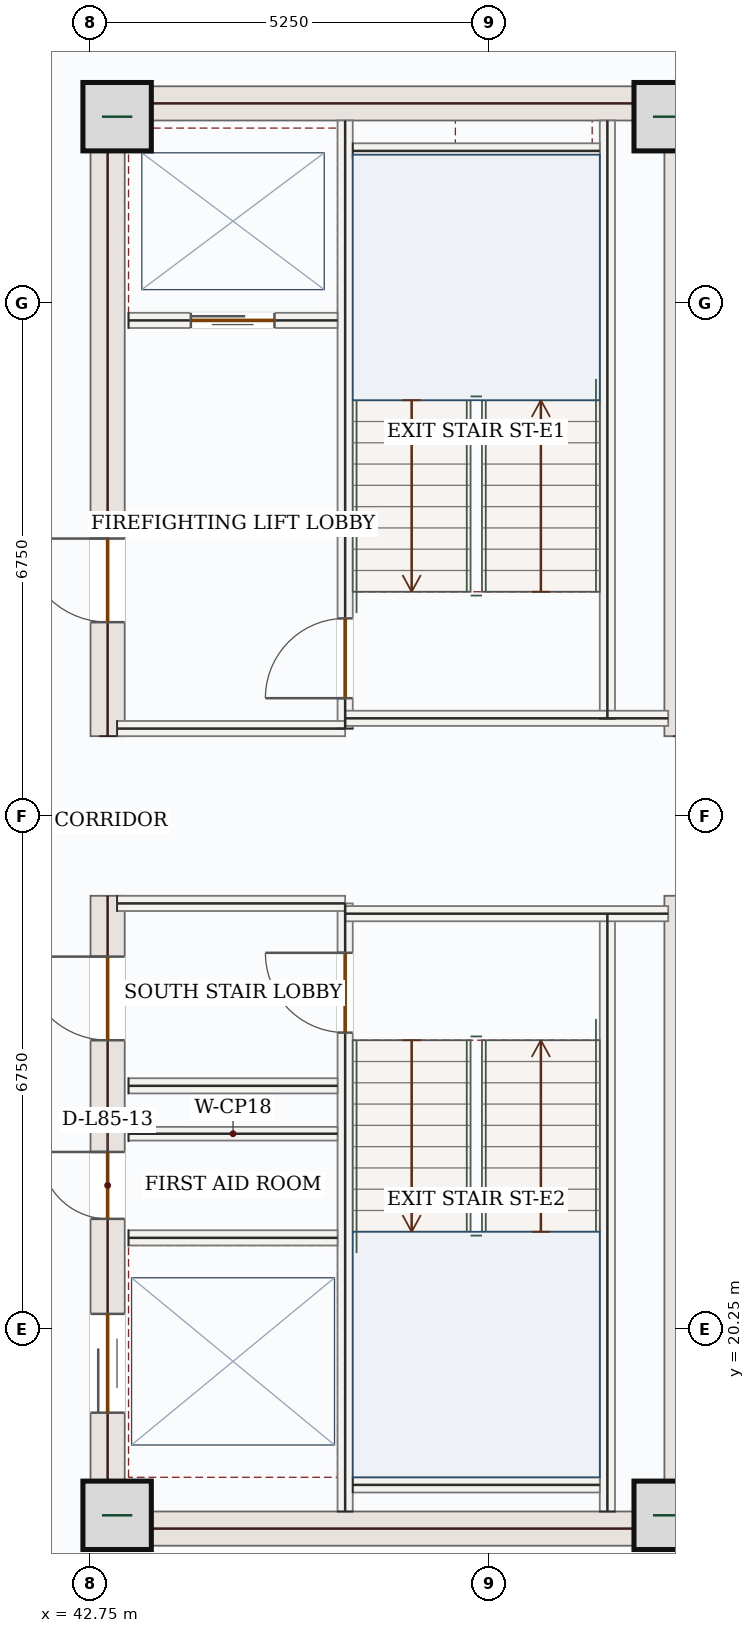
"""IFC4 building model, lengths in metres.
Left out: names, types, materials, properties, quantities, classifications, styles, units other than length and angle.
Written with IfcOpenShell. Run it as: python <this file> out.ifc"""

import sys

from ifc_helpers import new_model, si_unit, direction, frame, frame_2d, origin, origin_2d, place, context, subcontext, project, spatial, rectangle, extrude, source, transform, mapped, element, fill, save


model = new_model("IFC4")
c1 = context("Model", 3, precision=1e-05, world=origin(), true_north=direction((0.0, 1.0)))
c2 = subcontext(c1, "Body", "Model", "MODEL_VIEW")
j1 = project(units=[si_unit("LENGTHUNIT", "METRE"), si_unit("PLANEANGLEUNIT", "RADIAN")], contexts=[c1])
p1 = place(None, origin())
s1 = spatial("IfcSite", under=j1, at=p1, CompositionType="ELEMENT")
p2 = place(p1, origin())
s2 = spatial("IfcBuilding", under=s1, at=p2, CompositionType="ELEMENT")
p3 = place(p2, frame((0.0, 0.0, 349.8)))
s3 = spatial("IfcBuildingStorey", under=s2, at=p3, CompositionType="ELEMENT", Elevation=349.8)
p4 = place(p3, frame((42.975, 17.4, 0.0), z_axis=(0.0, 0.0, 1.0), x_axis=(0.0, 1.0, 0.0)))
e1 = element("IfcWall", 1, at=p4, inside=s3, PredefinedType="SHEAR", context=c2, shape_type="SweptSolid", body=[
    extrude(rectangle(XDim=8.55, YDim=0.45, at=frame_2d((4.275, 0.0))), origin(), (0.0, 0.0, 1.0), 3.5),
])
p5 = place(p4, frame((6.65, 0.0, 0.0)))
e2 = element("IfcOpeningElement", 2, at=p5, cuts=e1, PredefinedType="OPENING", context=c2, shape_type="SweptSolid", body=[
    extrude(rectangle(XDim=1.1, YDim=2.2, at=frame_2d((0.55, 1.1))), frame((0.0, 0.235, 0.0), z_axis=(0.0, -1.0, 0.0), x_axis=(1.0, 0.0, 0.0)), (0.0, 0.0, 1.0), 0.47),
])
p6 = place(p4, frame((1.75, 0.0, 0.0)))
e3 = element("IfcOpeningElement", 3, at=p6, cuts=e1, PredefinedType="OPENING", context=c2, shape_type="SweptSolid", body=[
    extrude(rectangle(XDim=1.3, YDim=2.2, at=frame_2d((0.65, 1.1))), frame((0.0, 0.235, 0.0), z_axis=(0.0, -1.0, 0.0), x_axis=(1.0, 0.0, 0.0)), (0.0, 0.0, 1.0), 0.47),
])
p7 = place(p4, frame((4.3, 0.0, 0.0)))
e4 = element("IfcOpeningElement", 4, at=p7, cuts=e1, PredefinedType="OPENING", context=c2, shape_type="SweptSolid", body=[
    extrude(rectangle(XDim=0.88, YDim=2.1, at=frame_2d((0.44, 1.05))), frame((0.0, 0.235, 0.0), z_axis=(0.0, -1.0, 0.0), x_axis=(1.0, 0.0, 0.0)), (0.0, 0.0, 1.0), 0.47),
])
p8 = place(p3, frame((42.975, 28.05, 0.0), z_axis=(0.0, 0.0, 1.0), x_axis=(0.0, 1.0, 0.0)))
e5 = element("IfcWall", 5, at=p8, inside=s3, PredefinedType="SHEAR", context=c2, shape_type="SweptSolid", body=[
    extrude(rectangle(XDim=8.55, YDim=0.45, at=frame_2d((4.275, 0.0))), origin(), (0.0, 0.0, 1.0), 3.5),
])
p9 = place(p8, frame((1.5, 0.0, 0.0)))
e6 = element("IfcOpeningElement", 6, at=p9, cuts=e5, PredefinedType="OPENING", context=c2, shape_type="SweptSolid", body=[
    extrude(rectangle(XDim=1.1, YDim=2.2, at=frame_2d((0.55, 1.1))), frame((0.0, 0.235, 0.0), z_axis=(0.0, -1.0, 0.0), x_axis=(1.0, 0.0, 0.0)), (0.0, 0.0, 1.0), 0.47),
])
m1 = source(origin(), c2, "Body", "SweptSolid", [
    extrude(rectangle(XDim=8.55, YDim=0.45, at=frame_2d((4.275, 0.0))), origin(), (0.0, 0.0, 1.0), 3.5),
])
for number, where, z_axis, x_axis in (
    (7, (50.525, 17.4, 0.0), (0.0, 0.0, 1.0), (0.0, 1.0, 0.0)),
    (8, (50.525, 28.05, 0.0), (0.0, 0.0, 1.0), (0.0, 1.0, 0.0)),
):
    element("IfcWall", number, at=place(p3, frame(where, z_axis=z_axis, x_axis=x_axis)), inside=s3, PredefinedType="SHEAR", context=c2, shape_type="MappedRepresentation", body=[
        mapped(m1, transform((0.0, 0.0, 0.0), x_axis=(1.0, 0.0, 0.0), y_axis=(0.0, 1.0, 0.0), z_axis=(0.0, 0.0, 1.0), scale=1.0)),
    ])
m2 = source(origin(), c2, "Body", "SweptSolid", [
    extrude(rectangle(XDim=7.1, YDim=0.45, at=frame_2d((3.55, 0.0))), origin(), (0.0, 0.0, 1.0), 3.5),
])
for number, where, z_axis, x_axis in (
    (9, (43.2, 17.625, 0.0), (0.0, 0.0, 1.0), (1.0, 0.0, 0.0)),
    (10, (43.2, 36.375, 0.0), (0.0, 0.0, 1.0), (1.0, 0.0, 0.0)),
):
    element("IfcWall", number, at=place(p3, frame(where, z_axis=z_axis, x_axis=x_axis)), inside=s3, PredefinedType="SHEAR", context=c2, shape_type="MappedRepresentation", body=[
        mapped(m2, transform((0.0, 0.0, 0.0), x_axis=(1.0, 0.0, 0.0), y_axis=(0.0, 1.0, 0.0), z_axis=(0.0, 0.0, 1.0), scale=1.0)),
    ])
m3 = source(origin(), c2, "Body", "SweptSolid", [
    extrude(rectangle(XDim=0.9, YDim=0.9, at=origin_2d()), origin(), (0.0, 0.0, 1.0), 3.75),
])
for number, where, z_axis, x_axis in (
    (11, (43.1, 17.8, 0.0), (0.0, 0.0, 1.0), (1.0, 0.0, 0.0)),
    (12, (50.35, 17.8, 0.0), (0.0, 0.0, 1.0), (1.0, 0.0, 0.0)),
    (13, (43.1, 36.2, 0.0), (0.0, 0.0, 1.0), (1.0, 0.0, 0.0)),
    (14, (50.35, 36.2, 0.0), (0.0, 0.0, 1.0), (1.0, 0.0, 0.0)),
):
    element("IfcColumn", number, at=place(p3, frame(where, z_axis=z_axis, x_axis=x_axis)), inside=s3, PredefinedType="COLUMN", context=c2, shape_type="MappedRepresentation", body=[
        mapped(m3, transform((0.0, 0.0, 0.0), x_axis=(1.0, 0.0, 0.0), y_axis=(0.0, 1.0, 0.0), z_axis=(0.0, 0.0, 1.0), scale=1.0)),
    ])
p10 = place(p3, frame((49.833, 39.006, 0.0), z_axis=(0.0, 0.0, 1.0), x_axis=(0.681733754317, -0.731600361006, 0.0)))
e15 = element("IfcWall", 15, at=p10, inside=s3, PredefinedType="SOLIDWALL", context=c2, shape_type="SweptSolid", body=[
    extrude(rectangle(XDim=4.734, YDim=0.28, at=frame_2d((2.367, 0.0))), origin(), (0.0, 0.0, 1.0), 3.5),
])
p11 = place(p10, frame((1.617, 0.0, 0.85)))
e16 = element("IfcOpeningElement", 16, at=p11, cuts=e15, PredefinedType="OPENING", context=c2, shape_type="SweptSolid", body=[
    extrude(rectangle(XDim=1.5, YDim=1.5, at=frame_2d((0.75, 0.75))), frame((0.0, 0.15, 0.0), z_axis=(0.0, -1.0, 0.0), x_axis=(1.0, 0.0, 0.0)), (0.0, 0.0, 1.0), 0.3),
])
m4 = source(origin(), c2, "Body", "SweptSolid", [
    extrude(rectangle(XDim=7.87, YDim=0.2, at=frame_2d((3.935, 0.0))), origin(), (0.0, 0.0, 1.0), 3.5),
])
for number, where, z_axis, x_axis in (
    (17, (49.55, 17.85, 0.0), (0.0, 0.0, 1.0), (0.0, 1.0, 0.0)),
    (18, (49.55, 28.28, 0.0), (0.0, 0.0, 1.0), (0.0, 1.0, 0.0)),
):
    element("IfcWall", number, at=place(p3, frame(where, z_axis=z_axis, x_axis=x_axis)), inside=s3, PredefinedType="SOLIDWALL", context=c2, shape_type="MappedRepresentation", body=[
        mapped(m4, transform((0.0, 0.0, 0.0), x_axis=(1.0, 0.0, 0.0), y_axis=(0.0, 1.0, 0.0), z_axis=(0.0, 0.0, 1.0), scale=1.0)),
    ])
p12 = place(p3, frame((46.1, 17.85, 0.0), z_axis=(0.0, 0.0, 1.0), x_axis=(0.0, 1.0, 0.0)))
e19 = element("IfcWall", 19, at=p12, inside=s3, PredefinedType="SOLIDWALL", context=c2, shape_type="SweptSolid", body=[
    extrude(rectangle(XDim=8.0, YDim=0.2, at=frame_2d((4.0, 0.0))), origin(), (0.0, 0.0, 1.0), 3.5),
])
p13 = place(p12, frame((6.3, 0.0, 0.0)))
e20 = element("IfcOpeningElement", 20, at=p13, cuts=e19, PredefinedType="OPENING", context=c2, shape_type="SweptSolid", body=[
    extrude(rectangle(XDim=1.05, YDim=2.15, at=frame_2d((0.525, 1.075))), frame((0.0, 0.11, 0.0), z_axis=(0.0, -1.0, 0.0), x_axis=(1.0, 0.0, 0.0)), (0.0, 0.0, 1.0), 0.22),
])
p14 = place(p3, frame((46.1, 28.15, 0.0), z_axis=(0.0, 0.0, 1.0), x_axis=(0.0, 1.0, 0.0)))
e21 = element("IfcWall", 21, at=p14, inside=s3, PredefinedType="SOLIDWALL", context=c2, shape_type="SweptSolid", body=[
    extrude(rectangle(XDim=8.0, YDim=0.2, at=frame_2d((4.0, 0.0))), origin(), (0.0, 0.0, 1.0), 3.5),
])
p15 = place(p14, frame((0.4, 0.0, 0.0)))
e22 = element("IfcOpeningElement", 22, at=p15, cuts=e21, PredefinedType="OPENING", context=c2, shape_type="SweptSolid", body=[
    extrude(rectangle(XDim=1.05, YDim=2.15, at=frame_2d((0.525, 1.075))), frame((0.0, 0.11, 0.0), z_axis=(0.0, -1.0, 0.0), x_axis=(1.0, 0.0, 0.0)), (0.0, 0.0, 1.0), 0.22),
])
m5 = source(origin(), c2, "Body", "SweptSolid", [
    extrude(rectangle(XDim=3.0, YDim=0.2, at=frame_2d((1.5, 0.0))), origin(), (0.0, 0.0, 1.0), 3.5),
])
p16 = place(p3, frame((43.1, 25.85, 0.0), z_axis=(0.0, 0.0, 1.0), x_axis=(1.0, 0.0, 0.0)))
e23 = element("IfcWall", 23, at=p16, inside=s3, PredefinedType="SOLIDWALL", context=c2, shape_type="MappedRepresentation", body=[
    mapped(m5, transform((0.0, 0.0, 0.0), x_axis=(1.0, 0.0, 0.0), y_axis=(0.0, 1.0, 0.0), z_axis=(0.0, 0.0, 1.0), scale=1.0)),
])
m6 = source(origin(), c2, "Body", "SweptSolid", [
    extrude(rectangle(XDim=4.25, YDim=0.2, at=frame_2d((2.125, 0.0))), origin(), (0.0, 0.0, 1.0), 3.5),
])
p17 = place(p3, frame((46.1, 25.715, 0.0), z_axis=(0.0, 0.0, 1.0), x_axis=(1.0, 0.0, 0.0)))
e24 = element("IfcWall", 24, at=p17, inside=s3, PredefinedType="SOLIDWALL", context=c2, shape_type="MappedRepresentation", body=[
    mapped(m6, transform((0.0, 0.0, 0.0), x_axis=(1.0, 0.0, 0.0), y_axis=(0.0, 1.0, 0.0), z_axis=(0.0, 0.0, 1.0), scale=1.0)),
])
p18 = place(p3, frame((43.1, 28.15, 0.0), z_axis=(0.0, 0.0, 1.0), x_axis=(1.0, 0.0, 0.0)))
e25 = element("IfcWall", 25, at=p18, inside=s3, PredefinedType="SOLIDWALL", context=c2, shape_type="MappedRepresentation", body=[
    mapped(m5, transform((0.0, 0.0, 0.0), x_axis=(1.0, 0.0, 0.0), y_axis=(0.0, 1.0, 0.0), z_axis=(0.0, 0.0, 1.0), scale=1.0)),
])
p19 = place(p3, frame((46.1, 28.285, 0.0), z_axis=(0.0, 0.0, 1.0), x_axis=(1.0, 0.0, 0.0)))
e26 = element("IfcWall", 26, at=p19, inside=s3, PredefinedType="SOLIDWALL", context=c2, shape_type="MappedRepresentation", body=[
    mapped(m6, transform((0.0, 0.0, 0.0), x_axis=(1.0, 0.0, 0.0), y_axis=(0.0, 1.0, 0.0), z_axis=(0.0, 0.0, 1.0), scale=1.0)),
])
m7 = source(origin(), c2, "Body", "SweptSolid", [
    extrude(rectangle(XDim=3.25, YDim=0.2, at=frame_2d((1.625, 0.0))), origin(), (0.0, 0.0, 1.0), 3.5),
])
for number, where, z_axis, x_axis in (
    (27, (46.2, 35.75, 0.0), (0.0, 0.0, 1.0), (1.0, 0.0, 0.0)),
    (28, (46.2, 18.2, 0.0), (0.0, 0.0, 1.0), (1.0, 0.0, 0.0)),
):
    element("IfcWall", number, at=place(p3, frame(where, z_axis=z_axis, x_axis=x_axis)), inside=s3, PredefinedType="SOLIDWALL", context=c2, shape_type="MappedRepresentation", body=[
        mapped(m7, transform((0.0, 0.0, 0.0), x_axis=(1.0, 0.0, 0.0), y_axis=(0.0, 1.0, 0.0), z_axis=(0.0, 0.0, 1.0), scale=1.0)),
    ])
p20 = place(p3, frame((43.25, 33.52, 0.0), z_axis=(0.0, 0.0, 1.0), x_axis=(1.0, 0.0, 0.0)))
e29 = element("IfcWall", 29, at=p20, inside=s3, PredefinedType="SOLIDWALL", context=c2, shape_type="SweptSolid", body=[
    extrude(rectangle(XDim=2.75, YDim=0.2, at=frame_2d((1.375, 0.0))), origin(), (0.0, 0.0, 1.0), 3.5),
])
p21 = place(p20, frame((0.82, 0.0, 0.0)))
e30 = element("IfcOpeningElement", 30, at=p21, cuts=e29, PredefinedType="OPENING", context=c2, shape_type="SweptSolid", body=[
    extrude(rectangle(XDim=1.1, YDim=2.15, at=frame_2d((0.55, 1.075))), frame((0.0, 0.11, 0.0), z_axis=(0.0, -1.0, 0.0), x_axis=(1.0, 0.0, 0.0)), (0.0, 0.0, 1.0), 0.22),
])
m8 = source(origin(), c2, "Body", "SweptSolid", [
    extrude(rectangle(XDim=2.75, YDim=0.2, at=frame_2d((1.375, 0.0))), origin(), (0.0, 0.0, 1.0), 3.5),
])
for number, where, z_axis, x_axis in (
    (31, (43.25, 23.45, 0.0), (0.0, 0.0, 1.0), (1.0, 0.0, 0.0)),
    (32, (43.25, 21.45, 0.0), (0.0, 0.0, 1.0), (1.0, 0.0, 0.0)),
):
    element("IfcWall", number, at=place(p3, frame(where, z_axis=z_axis, x_axis=x_axis)), inside=s3, PredefinedType="SOLIDWALL", context=c2, shape_type="MappedRepresentation", body=[
        mapped(m8, transform((0.0, 0.0, 0.0), x_axis=(1.0, 0.0, 0.0), y_axis=(0.0, 1.0, 0.0), z_axis=(0.0, 0.0, 1.0), scale=1.0)),
    ])
m9 = source(origin(), c2, "Body", "SweptSolid", [
    extrude(rectangle(XDim=2.75, YDim=0.18, at=frame_2d((1.375, 0.0))), origin(), (0.0, 0.0, 1.0), 3.5),
])
p22 = place(p3, frame((43.25, 22.82, 0.0), z_axis=(0.0, 0.0, 1.0), x_axis=(1.0, 0.0, 0.0)))
e33 = element("IfcWall", 33, at=p22, inside=s3, PredefinedType="PARTITIONING", context=c2, shape_type="MappedRepresentation", body=[
    mapped(m9, transform((0.0, 0.0, 0.0), x_axis=(1.0, 0.0, 0.0), y_axis=(0.0, 1.0, 0.0), z_axis=(0.0, 0.0, 1.0), scale=1.0)),
])
m10 = source(origin(), c2, "Body", "SweptSolid", [
    extrude(rectangle(XDim=1.05, YDim=2.15, at=frame_2d((0.525, 1.075))), frame((0.0, 0.025, 0.0), z_axis=(0.0, -1.0, 0.0), x_axis=(1.0, 0.0, 0.0)), (0.0, 0.0, 1.0), 0.05),
])
p23 = place(p15, origin())
e34 = element("IfcDoor", 34, at=p23, inside=s3, OperationType="SINGLE_SWING_LEFT", PredefinedType="DOOR", context=c2, shape_type="MappedRepresentation", body=[
    mapped(m10, transform((0.0, 0.0, 0.0), x_axis=(1.0, 0.0, 0.0), y_axis=(0.0, 1.0, 0.0), z_axis=(0.0, 0.0, 1.0), scale=1.0)),
])
fill(e22, e34)
p24 = place(p13, origin())
e35 = element("IfcDoor", 35, at=p24, inside=s3, OperationType="SINGLE_SWING_RIGHT", PredefinedType="DOOR", context=c2, shape_type="MappedRepresentation", body=[
    mapped(m10, transform((0.0, 0.0, 0.0), x_axis=(1.0, 0.0, 0.0), y_axis=(0.0, 1.0, 0.0), z_axis=(0.0, 0.0, 1.0), scale=1.0)),
])
fill(e20, e35)
m11 = source(origin(), c2, "Body", "SweptSolid", [
    extrude(rectangle(XDim=1.1, YDim=2.15, at=frame_2d((0.55, 1.075))), frame((0.0, 0.025, 0.0), z_axis=(0.0, -1.0, 0.0), x_axis=(1.0, 0.0, 0.0)), (0.0, 0.0, 1.0), 0.05),
])
p25 = place(p21, origin())
e36 = element("IfcDoor", 36, at=p25, inside=s3, OperationType="DOUBLE_DOOR_SLIDING", PredefinedType="DOOR", context=c2, shape_type="MappedRepresentation", body=[
    mapped(m11, transform((0.0, 0.0, 0.0), x_axis=(1.0, 0.0, 0.0), y_axis=(0.0, 1.0, 0.0), z_axis=(0.0, 0.0, 1.0), scale=1.0)),
])
fill(e30, e36)
m12 = source(origin(), c2, "Body", "SweptSolid", [
    extrude(rectangle(XDim=1.1, YDim=2.2, at=frame_2d((0.55, 1.1))), frame((0.0, 0.025, 0.0), z_axis=(0.0, -1.0, 0.0), x_axis=(1.0, 0.0, 0.0)), (0.0, 0.0, 1.0), 0.05),
])
p26 = place(p9, origin())
e37 = element("IfcDoor", 37, at=p26, inside=s3, OperationType="SINGLE_SWING_RIGHT", PredefinedType="DOOR", context=c2, shape_type="MappedRepresentation", body=[
    mapped(m12, transform((0.0, 0.0, 0.0), x_axis=(1.0, 0.0, 0.0), y_axis=(0.0, 1.0, 0.0), z_axis=(0.0, 0.0, 1.0), scale=1.0)),
])
fill(e6, e37)
p27 = place(p5, origin())
e38 = element("IfcDoor", 38, at=p27, inside=s3, OperationType="SINGLE_SWING_RIGHT", PredefinedType="DOOR", context=c2, shape_type="MappedRepresentation", body=[
    mapped(m12, transform((0.0, 0.0, 0.0), x_axis=(1.0, 0.0, 0.0), y_axis=(0.0, 1.0, 0.0), z_axis=(0.0, 0.0, 1.0), scale=1.0)),
])
fill(e2, e38)
m13 = source(origin(), c2, "Body", "SweptSolid", [
    extrude(rectangle(XDim=1.3, YDim=2.2, at=frame_2d((0.65, 1.1))), frame((0.0, 0.025, 0.0), z_axis=(0.0, -1.0, 0.0), x_axis=(1.0, 0.0, 0.0)), (0.0, 0.0, 1.0), 0.05),
])
p28 = place(p6, origin())
e39 = element("IfcDoor", 39, at=p28, inside=s3, OperationType="DOUBLE_DOOR_SLIDING", PredefinedType="DOOR", context=c2, shape_type="MappedRepresentation", body=[
    mapped(m13, transform((0.0, 0.0, 0.0), x_axis=(1.0, 0.0, 0.0), y_axis=(0.0, 1.0, 0.0), z_axis=(0.0, 0.0, 1.0), scale=1.0)),
])
fill(e3, e39)
m14 = source(origin(), c2, "Body", "SweptSolid", [
    extrude(rectangle(XDim=0.88, YDim=2.1, at=frame_2d((0.44, 1.05))), frame((0.0, 0.025, 0.0), z_axis=(0.0, -1.0, 0.0), x_axis=(1.0, 0.0, 0.0)), (0.0, 0.0, 1.0), 0.05),
])
p29 = place(p7, origin())
e40 = element("IfcDoor", 40, at=p29, inside=s3, OperationType="SINGLE_SWING_RIGHT", PredefinedType="DOOR", context=c2, shape_type="MappedRepresentation", body=[
    mapped(m14, transform((0.0, 0.0, 0.0), x_axis=(1.0, 0.0, 0.0), y_axis=(0.0, 1.0, 0.0), z_axis=(0.0, 0.0, 1.0), scale=1.0)),
])
fill(e4, e40)
save(model, sys.argv[1])
